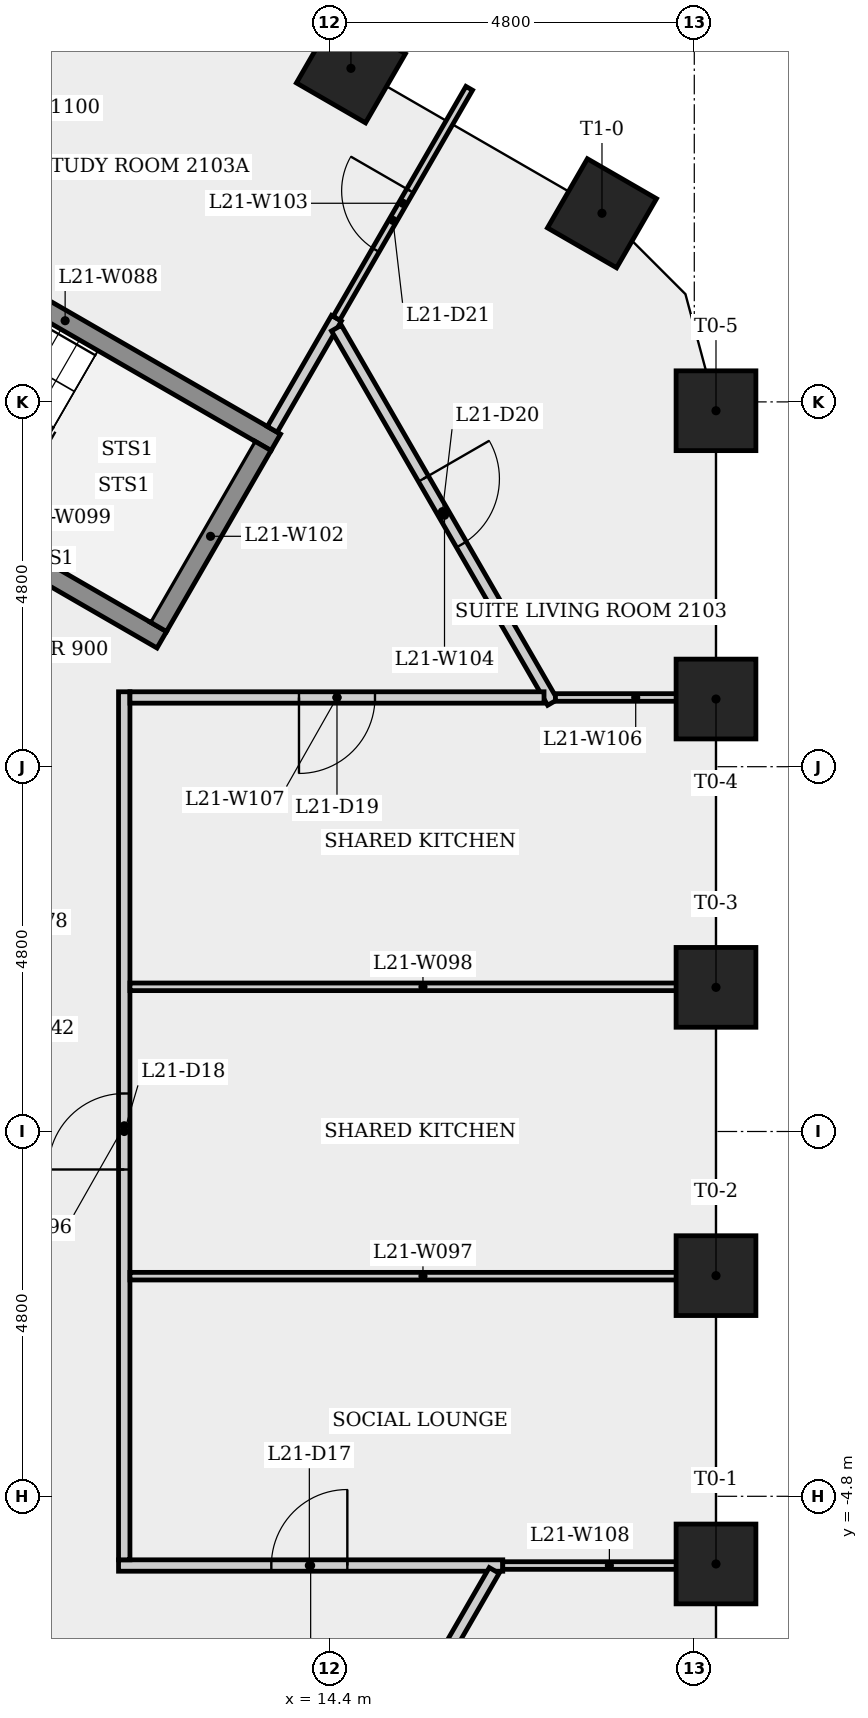
"""IFC4 building model, lengths in metres.
Left out: names, types, materials, properties, quantities, classifications, styles, units other than length and angle.
Written with IfcOpenShell. Run it as: python <this file> out.ifc"""

import sys

from ifc_helpers import new_model, si_unit, direction, frame, frame_2d, origin, origin_2d, place, context, subcontext, project, spatial, rectangle, extrude, element, fill, save


model = new_model("IFC4")
c1 = context("Model", 3, precision=1e-05, world=origin(), true_north=direction((0.0, 1.0)))
c2 = subcontext(c1, "Body", "Model", "MODEL_VIEW")
j1 = project(units=[si_unit("LENGTHUNIT", "METRE"), si_unit("PLANEANGLEUNIT", "RADIAN")], contexts=[c1])
p1 = place(None, origin())
s1 = spatial("IfcSite", under=j1, at=p1, CompositionType="ELEMENT")
p2 = place(p1, origin())
s2 = spatial("IfcBuilding", under=s1, at=p2, CompositionType="ELEMENT")
p3 = place(p2, frame((0.0, 0.0, 83.1)))
s3 = spatial("IfcBuildingStorey", under=s2, at=p3, CompositionType="ELEMENT", Elevation=83.1)
for number, where, z_axis, x_axis in (
    (1, (19.486, -5.69, 0.0), (0.0, 0.0, 1.0), (1.0, 0.0, 0.0)),
    (2, (19.486, -1.897, 0.0), (0.0, 0.0, 1.0), (1.0, 0.0, 0.0)),
    (3, (19.486, 1.897, 0.0), (0.0, 0.0, 1.0), (1.0, 0.0, 0.0)),
    (4, (19.486, 5.69, 0.0), (0.0, 0.0, 1.0), (1.0, 0.0, 0.0)),
    (5, (19.486, 9.484, 0.0), (0.0, 0.0, 1.0), (1.0, 0.0, 0.0)),
    (6, (17.986, 12.082, 0.0), (0.0, 0.0, 1.0), (0.5, 0.866, 0.0)),
    (7, (14.683, 13.989, 0.0), (0.0, 0.0, 1.0), (0.5, 0.866, 0.0)),
):
    element("IfcColumn", number, at=place(p3, frame(where, z_axis=z_axis, x_axis=x_axis)), inside=s3, PredefinedType="COLUMN", context=c2, shape_type="SweptSolid", body=[
        extrude(rectangle(XDim=1.05, YDim=1.05, at=origin_2d()), origin(), (0.0, 0.0, 1.0), 3.4),
    ])
p4 = place(p3, frame((8.151, 12.268, 0.0), z_axis=(0.0, 0.0, 1.0), x_axis=(0.866025499775, -0.499999833739, 0.0)))
e8 = element("IfcWall", 8, at=p4, inside=s3, PredefinedType="SHEAR", context=c2, shape_type="SweptSolid", body=[
    extrude(rectangle(XDim=6.4, YDim=0.25, at=frame_2d((3.2, 0.0))), origin(), (0.0, 0.0, 1.0), 3.05),
])
p5 = place(p3, frame((11.625, -5.711, 0.0), z_axis=(0.0, 0.0, 1.0), x_axis=(1.0, 0.0, 0.0)))
e9 = element("IfcWall", 9, at=p5, inside=s3, PredefinedType="PARTITIONING", context=c2, shape_type="SweptSolid", body=[
    extrude(rectangle(XDim=5.055, YDim=0.15, at=frame_2d((2.528, 0.0))), origin(), (0.0, 0.0, 1.0), 3.05),
])
p6 = place(p5, frame((2.01, 0.0, 0.0)))
e10 = element("IfcOpeningElement", 10, at=p6, cuts=e9, PredefinedType="OPENING", context=c2, shape_type="SweptSolid", body=[
    extrude(rectangle(XDim=1.0, YDim=2.1, at=frame_2d((0.5, 1.05))), frame((0.0, 0.085, 0.0), z_axis=(0.0, -1.0, 0.0), x_axis=(1.0, 0.0, 0.0)), (0.0, 0.0, 1.0), 0.17),
])
p7 = place(p3, frame((11.7, -5.636, 0.0), z_axis=(0.0, 0.0, 1.0), x_axis=(0.0, 1.0, 0.0)))
e11 = element("IfcWall", 11, at=p7, inside=s3, PredefinedType="PARTITIONING", context=c2, shape_type="SweptSolid", body=[
    extrude(rectangle(XDim=11.422, YDim=0.15, at=frame_2d((5.711, 0.0))), origin(), (0.0, 0.0, 1.0), 3.05),
])
p8 = place(p7, frame((5.136, 0.0, 0.0)))
e12 = element("IfcOpeningElement", 12, at=p8, cuts=e11, PredefinedType="OPENING", context=c2, shape_type="SweptSolid", body=[
    extrude(rectangle(XDim=1.0, YDim=2.1, at=frame_2d((0.5, 1.05))), frame((0.0, 0.085, 0.0), z_axis=(0.0, -1.0, 0.0), x_axis=(1.0, 0.0, 0.0)), (0.0, 0.0, 1.0), 0.17),
])
for number, where, z_axis, x_axis in (
    (13, (11.775, -1.904, 0.0), (0.0, 0.0, 1.0), (1.0, 0.0, 0.0)),
    (14, (11.775, 1.904, 0.0), (0.0, 0.0, 1.0), (1.0, 0.0, 0.0)),
):
    element("IfcWall", number, at=place(p3, frame(where, z_axis=z_axis, x_axis=x_axis)), inside=s3, PredefinedType="PARTITIONING", context=c2, shape_type="SweptSolid", body=[
        extrude(rectangle(XDim=7.711, YDim=0.1, at=frame_2d((3.855, 0.0))), origin(), (0.0, 0.0, 1.0), 3.05),
    ])
p9 = place(p3, frame((12.194, 6.47, 0.0), z_axis=(0.0, 0.0, 1.0), x_axis=(-0.866025499775, 0.499999833739, 0.0)))
e15 = element("IfcWall", 15, at=p9, inside=s3, PredefinedType="SHEAR", context=c2, shape_type="SweptSolid", body=[
    extrude(rectangle(XDim=6.4, YDim=0.25, at=frame_2d((3.2, 0.0))), origin(), (0.0, 0.0, 1.0), 3.05),
])
p10 = place(p9, frame((5.25, 0.0, 0.0)))
e16 = element("IfcOpeningElement", 16, at=p10, cuts=e15, PredefinedType="OPENING", context=c2, shape_type="SweptSolid", body=[
    extrude(rectangle(XDim=1.0, YDim=2.1, at=frame_2d((0.5, 1.05))), frame((0.0, 0.135, 0.0), z_axis=(0.0, -1.0, 0.0), x_axis=(1.0, 0.0, 0.0)), (0.0, 0.0, 1.0), 0.27),
])
p11 = place(p3, frame((13.648, 9.239, 0.0), z_axis=(0.0, 0.0, 1.0), x_axis=(0.500027029611, 0.866009797669, 0.0)))
e17 = element("IfcWall", 17, at=p11, inside=s3, PredefinedType="PARTITIONING", context=c2, shape_type="SweptSolid", body=[
    extrude(rectangle(XDim=1.688, YDim=0.15, at=frame_2d((0.844, 0.0))), origin(), (0.0, 0.0, 1.0), 3.05),
])
p12 = place(p3, frame((13.523, 9.022, 0.0), z_axis=(0.0, 0.0, 1.0), x_axis=(-0.500034990121, -0.866005201286, 0.0)))
e18 = element("IfcWall", 18, at=p12, inside=s3, PredefinedType="SHEAR", context=c2, shape_type="SweptSolid", body=[
    extrude(rectangle(XDim=2.75, YDim=0.25, at=frame_2d((1.375, 0.0))), origin(), (0.0, 0.0, 1.0), 3.05),
])
p13 = place(p3, frame((14.492, 10.701, 0.0), z_axis=(0.0, 0.0, 1.0), x_axis=(0.500024920542, 0.866011015424, 0.0)))
e19 = element("IfcWall", 19, at=p13, inside=s3, PredefinedType="PARTITIONING", context=c2, shape_type="SweptSolid", body=[
    extrude(rectangle(XDim=3.493, YDim=0.1, at=frame_2d((1.747, 0.0))), origin(), (0.0, 0.0, 1.0), 3.05),
])
p14 = place(p13, frame((1.036, 0.0, 0.0)))
e20 = element("IfcOpeningElement", 20, at=p14, cuts=e19, PredefinedType="OPENING", context=c2, shape_type="SweptSolid", body=[
    extrude(rectangle(XDim=0.9, YDim=2.1, at=frame_2d((0.45, 1.05))), frame((0.0, 0.06, 0.0), z_axis=(0.0, -1.0, 0.0), x_axis=(1.0, 0.0, 0.0)), (0.0, 0.0, 1.0), 0.12),
])
p15 = place(p3, frame((14.492, 10.571, 0.0), z_axis=(0.0, 0.0, 1.0), x_axis=(0.50000363893, -0.866023302837, 0.0)))
e21 = element("IfcWall", 21, at=p15, inside=s3, PredefinedType="PARTITIONING", context=c2, shape_type="SweptSolid", body=[
    extrude(rectangle(XDim=5.687, YDim=0.15, at=frame_2d((2.844, 0.0))), origin(), (0.0, 0.0, 1.0), 3.05),
])
p16 = place(p15, frame((2.289, 0.0, 0.0)))
e22 = element("IfcOpeningElement", 22, at=p16, cuts=e21, PredefinedType="OPENING", context=c2, shape_type="SweptSolid", body=[
    extrude(rectangle(XDim=1.0, YDim=2.1, at=frame_2d((0.5, 1.05))), frame((0.0, 0.085, 0.0), z_axis=(0.0, -1.0, 0.0), x_axis=(1.0, 0.0, 0.0)), (0.0, 0.0, 1.0), 0.17),
])
p17 = place(p3, frame((16.568, -5.776, 0.0), z_axis=(0.0, 0.0, 1.0), x_axis=(-0.499985297152, -0.866033892311, 0.0)))
e23 = element("IfcWall", 23, at=p17, inside=s3, PredefinedType="PARTITIONING", context=c2, shape_type="SweptSolid", body=[
    extrude(rectangle(XDim=8.308, YDim=0.15, at=frame_2d((4.154, 0.0))), origin(), (0.0, 0.0, 1.0), 3.05),
])
p18 = place(p17, frame((3.654, 0.0, 0.0)))
e24 = element("IfcOpeningElement", 24, at=p18, cuts=e23, PredefinedType="OPENING", context=c2, shape_type="SweptSolid", body=[
    extrude(rectangle(XDim=1.0, YDim=2.1, at=frame_2d((0.5, 1.05))), frame((0.0, 0.085, 0.0), z_axis=(0.0, -1.0, 0.0), x_axis=(1.0, 0.0, 0.0)), (0.0, 0.0, 1.0), 0.17),
])
p19 = place(p3, frame((17.373, 5.711, 0.0), z_axis=(0.0, 0.0, 1.0), x_axis=(1.0, 0.0, 0.0)))
e25 = element("IfcWall", 25, at=p19, inside=s3, PredefinedType="PARTITIONING", context=c2, shape_type="SweptSolid", body=[
    extrude(rectangle(XDim=2.113, YDim=0.1, at=frame_2d((1.056, 0.0))), origin(), (0.0, 0.0, 1.0), 3.05),
])
p20 = place(p3, frame((17.223, 5.711, 0.0), z_axis=(0.0, 0.0, 1.0), x_axis=(-1.0, 0.0, 0.0)))
e26 = element("IfcWall", 26, at=p20, inside=s3, PredefinedType="PARTITIONING", context=c2, shape_type="SweptSolid", body=[
    extrude(rectangle(XDim=5.448, YDim=0.15, at=frame_2d((2.724, 0.0))), origin(), (0.0, 0.0, 1.0), 3.05),
])
p21 = place(p20, frame((2.224, 0.0, 0.0)))
e27 = element("IfcOpeningElement", 27, at=p21, cuts=e26, PredefinedType="OPENING", context=c2, shape_type="SweptSolid", body=[
    extrude(rectangle(XDim=1.0, YDim=2.1, at=frame_2d((0.5, 1.05))), frame((0.0, 0.085, 0.0), z_axis=(0.0, -1.0, 0.0), x_axis=(1.0, 0.0, 0.0)), (0.0, 0.0, 1.0), 0.17),
])
p22 = place(p3, frame((19.486, -5.711, 0.0), z_axis=(0.0, 0.0, 1.0), x_axis=(-1.0, 0.0, 0.0)))
e28 = element("IfcWall", 28, at=p22, inside=s3, PredefinedType="PARTITIONING", context=c2, shape_type="SweptSolid", body=[
    extrude(rectangle(XDim=2.805, YDim=0.1, at=frame_2d((1.403, 0.0))), origin(), (0.0, 0.0, 1.0), 3.05),
])
p23 = place(p6, origin())
e29 = element("IfcDoor", 29, at=p23, inside=s3, OperationType="SINGLE_SWING_RIGHT", PredefinedType="DOOR", context=c2, shape_type="SweptSolid", body=[
    extrude(rectangle(XDim=1.0, YDim=2.1, at=frame_2d((0.5, 1.05))), frame((0.0, 0.025, 0.0), z_axis=(0.0, -1.0, 0.0), x_axis=(1.0, 0.0, 0.0)), (0.0, 0.0, 1.0), 0.05),
])
fill(e10, e29)
p24 = place(p8, origin())
e30 = element("IfcDoor", 30, at=p24, inside=s3, OperationType="SINGLE_SWING_LEFT", PredefinedType="DOOR", context=c2, shape_type="SweptSolid", body=[
    extrude(rectangle(XDim=1.0, YDim=2.1, at=frame_2d((0.5, 1.05))), frame((0.0, 0.025, 0.0), z_axis=(0.0, -1.0, 0.0), x_axis=(1.0, 0.0, 0.0)), (0.0, 0.0, 1.0), 0.05),
])
fill(e12, e30)
p25 = place(p21, origin())
e31 = element("IfcDoor", 31, at=p25, inside=s3, OperationType="SINGLE_SWING_RIGHT", PredefinedType="DOOR", context=c2, shape_type="SweptSolid", body=[
    extrude(rectangle(XDim=1.0, YDim=2.1, at=frame_2d((0.5, 1.05))), frame((0.0, 0.025, 0.0), z_axis=(0.0, -1.0, 0.0), x_axis=(1.0, 0.0, 0.0)), (0.0, 0.0, 1.0), 0.05),
])
fill(e27, e31)
p26 = place(p16, origin())
e32 = element("IfcDoor", 32, at=p26, inside=s3, OperationType="SINGLE_SWING_LEFT", PredefinedType="DOOR", context=c2, shape_type="SweptSolid", body=[
    extrude(rectangle(XDim=1.0, YDim=2.1, at=frame_2d((0.5, 1.05))), frame((0.0, 0.025, 0.0), z_axis=(0.0, -1.0, 0.0), x_axis=(1.0, 0.0, 0.0)), (0.0, 0.0, 1.0), 0.05),
])
fill(e22, e32)
p27 = place(p14, origin())
e33 = element("IfcDoor", 33, at=p27, inside=s3, OperationType="SINGLE_SWING_RIGHT", PredefinedType="DOOR", context=c2, shape_type="SweptSolid", body=[
    extrude(rectangle(XDim=0.9, YDim=2.1, at=frame_2d((0.45, 1.05))), frame((0.0, 0.025, 0.0), z_axis=(0.0, -1.0, 0.0), x_axis=(1.0, 0.0, 0.0)), (0.0, 0.0, 1.0), 0.05),
])
fill(e20, e33)
save(model, sys.argv[1])
